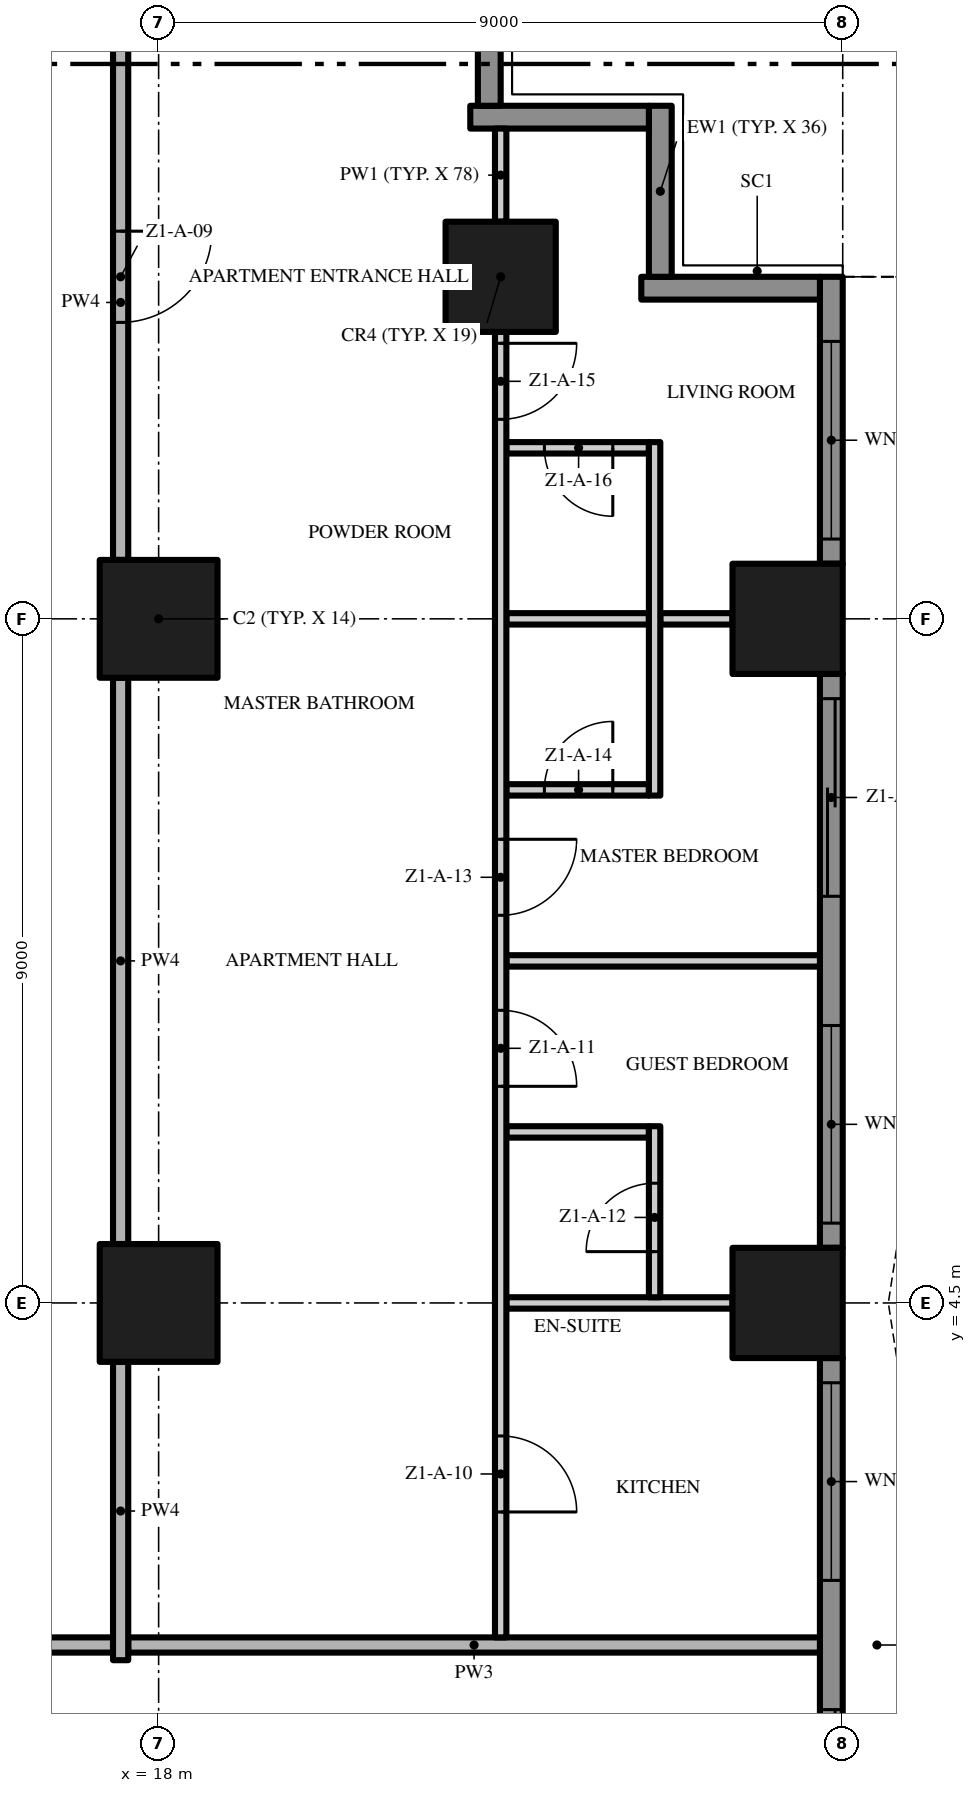
"""IFC4 building model, lengths in metres.
Left out: names, types, materials, properties, quantities, classifications, styles, units other than length and angle.
Written with IfcOpenShell. Run it as: python <this file> out.ifc"""

import sys

from ifc_helpers import new_model, si_unit, direction, frame, frame_2d, origin, origin_2d, place, context, subcontext, project, spatial, polyline, rectangle, outline, extrude, element, fill, save


model = new_model("IFC4")
c1 = context("Model", 3, precision=1e-05, world=origin(), true_north=direction((0.0, 1.0)))
c2 = subcontext(c1, "Body", "Model", "MODEL_VIEW")
j1 = project(units=[si_unit("LENGTHUNIT", "METRE"), si_unit("PLANEANGLEUNIT", "RADIAN")], contexts=[c1])
p1 = place(None, origin())
s1 = spatial("IfcSite", under=j1, at=p1, CompositionType="ELEMENT")
p2 = place(p1, origin())
s2 = spatial("IfcBuilding", under=s1, at=p2, CompositionType="ELEMENT")
p3 = place(p2, frame((0.0, 0.0, 22.6)))
s3 = spatial("IfcBuildingStorey", under=s2, at=p3, CompositionType="ELEMENT", Elevation=22.6)
for number, where, z_axis, x_axis in (
    (1, (18.0, 13.5, 0.0), (0.0, 0.0, 1.0), (1.0, 0.0, 0.0)),
    (2, (18.0, 4.5, 0.0), (0.0, 0.0, 1.0), (1.0, 0.0, 0.0)),
):
    element("IfcColumn", number, at=place(p3, frame(where, z_axis=z_axis, x_axis=x_axis)), inside=s3, PredefinedType="COLUMN", context=c2, shape_type="SweptSolid", body=[
        extrude(rectangle(XDim=1.55, YDim=1.55, at=origin_2d()), origin(), (0.0, 0.0, 1.0), 3.5),
    ])
for number, where, z_axis, x_axis in (
    (3, (26.275, 13.5, 0.0), (0.0, 0.0, 1.0), (1.0, 0.0, 0.0)),
    (4, (22.5, 18.0, 0.0), (0.0, 0.0, 1.0), (1.0, 0.0, 0.0)),
    (5, (26.275, 4.5, 0.0), (0.0, 0.0, 1.0), (1.0, 0.0, 0.0)),
):
    element("IfcColumn", number, at=place(p3, frame(where, z_axis=z_axis, x_axis=x_axis)), inside=s3, PredefinedType="COLUMN", context=c2, shape_type="SweptSolid", body=[
        extrude(rectangle(XDim=1.45, YDim=1.45, at=origin_2d()), origin(), (0.0, 0.0, 1.0), 3.5),
    ])
p4 = place(p3, frame((26.85, 3.775, 0.0), z_axis=(0.0, 0.0, 1.0), x_axis=(0.0, -1.0, 0.0)))
e6 = element("IfcWall", 6, at=p4, inside=s3, PredefinedType="SOLIDWALL", context=c2, shape_type="SweptSolid", body=[
    extrude(rectangle(XDim=7.55, YDim=0.3, at=frame_2d((3.775, 0.0))), origin(), (0.0, 0.0, 1.0), 3.5),
])
p5 = place(p4, frame((4.625, 0.0, 0.0)))
e7 = element("IfcOpeningElement", 7, at=p5, cuts=e6, PredefinedType="OPENING", context=c2, shape_type="SweptSolid", body=[
    extrude(rectangle(XDim=2.6, YDim=2.4, at=frame_2d((1.3, 1.2))), frame((0.0, 0.16, 0.0), z_axis=(0.0, -1.0, 0.0), x_axis=(1.0, 0.0, 0.0)), (0.0, 0.0, 1.0), 0.32),
])
p6 = place(p4, frame((0.325, 0.0, 0.45)))
e8 = element("IfcOpeningElement", 8, at=p6, cuts=e6, PredefinedType="OPENING", context=c2, shape_type="SweptSolid", body=[
    extrude(rectangle(XDim=2.6, YDim=2.65, at=frame_2d((1.3, 1.325))), frame((0.0, 0.16, 0.0), z_axis=(0.0, -1.0, 0.0), x_axis=(1.0, 0.0, 0.0)), (0.0, 0.0, 1.0), 0.32),
])
p7 = place(p3, frame((26.85, 12.775, 0.0), z_axis=(0.0, 0.0, 1.0), x_axis=(0.0, -1.0, 0.0)))
e9 = element("IfcWall", 9, at=p7, inside=s3, PredefinedType="SOLIDWALL", context=c2, shape_type="SweptSolid", body=[
    extrude(rectangle(XDim=7.55, YDim=0.3, at=frame_2d((3.775, 0.0))), origin(), (0.0, 0.0, 1.0), 3.5),
])
p8 = place(p7, frame((4.625, 0.0, 0.45)))
e10 = element("IfcOpeningElement", 10, at=p8, cuts=e9, PredefinedType="OPENING", context=c2, shape_type="SweptSolid", body=[
    extrude(rectangle(XDim=2.6, YDim=2.65, at=frame_2d((1.3, 1.325))), frame((0.0, 0.16, 0.0), z_axis=(0.0, -1.0, 0.0), x_axis=(1.0, 0.0, 0.0)), (0.0, 0.0, 1.0), 0.32),
])
p9 = place(p7, frame((0.325, 0.0, 0.0)))
e11 = element("IfcOpeningElement", 11, at=p9, cuts=e9, PredefinedType="OPENING", context=c2, shape_type="SweptSolid", body=[
    extrude(rectangle(XDim=2.6, YDim=2.4, at=frame_2d((1.3, 1.2))), frame((0.0, 0.16, 0.0), z_axis=(0.0, -1.0, 0.0), x_axis=(1.0, 0.0, 0.0)), (0.0, 0.0, 1.0), 0.32),
])
p10 = place(p3, frame((26.85, 18.0, 0.0), z_axis=(0.0, 0.0, 1.0), x_axis=(0.0, -1.0, 0.0)))
e12 = element("IfcWall", 12, at=p10, inside=s3, PredefinedType="SOLIDWALL", context=c2, shape_type="SweptSolid", body=[
    extrude(rectangle(XDim=3.775, YDim=0.3, at=frame_2d((1.887, 0.0))), origin(), (0.0, 0.0, 1.0), 3.5),
])
p11 = place(p10, frame((0.85, 0.0, 0.45)))
e13 = element("IfcOpeningElement", 13, at=p11, cuts=e12, PredefinedType="OPENING", context=c2, shape_type="SweptSolid", body=[
    extrude(rectangle(XDim=2.6, YDim=2.65, at=frame_2d((1.3, 1.325))), frame((0.0, 0.16, 0.0), z_axis=(0.0, -1.0, 0.0), x_axis=(1.0, 0.0, 0.0)), (0.0, 0.0, 1.0), 0.32),
])
p12 = place(p3, frame((24.35, 17.85, 0.0), z_axis=(0.0, 0.0, 1.0), x_axis=(1.0, 0.0, 0.0)))
e14 = element("IfcWall", 14, at=p12, inside=s3, PredefinedType="SOLIDWALL", context=c2, shape_type="SweptSolid", body=[
    extrude(rectangle(XDim=2.35, YDim=0.3, at=frame_2d((1.175, 0.0))), origin(), (0.0, 0.0, 1.0), 3.5),
])
p13 = place(p3, frame((24.6, 20.25, 0.0), z_axis=(0.0, 0.0, 1.0), x_axis=(0.0, -1.0, 0.0)))
e15 = element("IfcWall", 15, at=p13, inside=s3, PredefinedType="SOLIDWALL", context=c2, shape_type="SweptSolid", body=[
    extrude(rectangle(XDim=2.25, YDim=0.3, at=frame_2d((1.125, 0.0))), origin(), (0.0, 0.0, 1.0), 3.5),
])
p14 = place(p3, frame((22.1, 20.1, 0.0), z_axis=(0.0, 0.0, 1.0), x_axis=(1.0, 0.0, 0.0)))
e16 = element("IfcWall", 16, at=p14, inside=s3, PredefinedType="SOLIDWALL", context=c2, shape_type="SweptSolid", body=[
    extrude(rectangle(XDim=2.35, YDim=0.3, at=frame_2d((1.175, 0.0))), origin(), (0.0, 0.0, 1.0), 3.5),
])
p15 = place(p3, frame((22.35, 22.5, 0.0), z_axis=(0.0, 0.0, 1.0), x_axis=(0.0, -1.0, 0.0)))
e17 = element("IfcWall", 17, at=p15, inside=s3, PredefinedType="SOLIDWALL", context=c2, shape_type="SweptSolid", body=[
    extrude(rectangle(XDim=2.25, YDim=0.3, at=frame_2d((1.125, 0.0))), origin(), (0.0, 0.0, 1.0), 3.5),
])
p16 = place(p3, origin())
e18 = element("IfcWall", 18, at=p16, inside=s3, PredefinedType="USERDEFINED", context=c2, shape_type="SweptSolid", body=[
    extrude(outline(polyline([(30.0, -18.0), (29.771, -16.5), (29.171, -15.0), (28.429, -13.5), (27.829, -12.0), (27.6, -10.5), (27.829, -9.0), (28.429, -7.5), (29.171, -6.0), (29.771, -4.5), (30.0, -3.0), (29.771, -1.5), (29.171, 0.0), (28.429, 1.5), (27.829, 3.0), (27.6, 4.5), (27.829, 6.0), (28.429, 7.5), (29.171, 9.0), (29.771, 10.5), (30.0, 12.0), (29.771, 13.5), (29.171, 15.0), (28.429, 16.5), (27.829, 18.0), (27.597, 17.907), (28.201, 16.398), (28.942, 14.898), (29.528, 13.434), (29.747, 12.0), (29.528, 10.566), (28.942, 9.102), (28.201, 7.602), (27.586, 6.066), (27.347, 4.5), (27.586, 2.934), (28.201, 1.398), (28.942, -0.102), (29.528, -1.566), (29.747, -3.0), (29.528, -4.434), (28.942, -5.898), (28.201, -7.398), (27.586, -8.934), (27.347, -10.5), (27.586, -12.066), (28.201, -13.602), (28.942, -15.102), (29.528, -16.566), (29.753, -18.038), (30.0, -18.0)])), origin(), (0.0, 0.0, 1.0), 0.9),
])
p17 = place(p3, frame((17.4, 0.0, 0.0), z_axis=(0.0, 0.0, 1.0), x_axis=(-1.0, 0.0, 0.0)))
e19 = element("IfcWall", 19, at=p17, inside=s3, PredefinedType="PARTITIONING", context=c2, shape_type="SweptSolid", body=[
    extrude(rectangle(XDim=17.3, YDim=0.2, at=frame_2d((8.65, 0.0))), origin(), (0.0, 0.0, 1.0), 3.5),
])
p18 = place(p17, frame((7.65, 0.0, 0.0)))
e20 = element("IfcOpeningElement", 20, at=p18, cuts=e19, PredefinedType="OPENING", context=c2, shape_type="SweptSolid", body=[
    extrude(rectangle(XDim=1.5, YDim=2.4, at=frame_2d((0.75, 1.2))), frame((0.0, 0.11, 0.0), z_axis=(0.0, -1.0, 0.0), x_axis=(1.0, 0.0, 0.0)), (0.0, 0.0, 1.0), 0.22),
])
p19 = place(p3, frame((17.6, 0.0, 0.0), z_axis=(0.0, 0.0, 1.0), x_axis=(1.0, 0.0, 0.0)))
e21 = element("IfcWall", 21, at=p19, inside=s3, PredefinedType="PARTITIONING", context=c2, shape_type="SweptSolid", body=[
    extrude(rectangle(XDim=9.1, YDim=0.2, at=frame_2d((4.55, 0.0))), origin(), (0.0, 0.0, 1.0), 3.5),
])
p20 = place(p3, frame((22.575, 4.5, 0.0), z_axis=(0.0, 0.0, 1.0), x_axis=(1.0, 0.0, 0.0)))
e22 = element("IfcWall", 22, at=p20, inside=s3, PredefinedType="PARTITIONING", context=c2, shape_type="SweptSolid", body=[
    extrude(rectangle(XDim=2.975, YDim=0.15, at=frame_2d((1.488, 0.0))), origin(), (0.0, 0.0, 1.0), 3.5),
])
p21 = place(p3, frame((22.575, 6.75, 0.0), z_axis=(0.0, 0.0, 1.0), x_axis=(1.0, 0.0, 0.0)))
e23 = element("IfcWall", 23, at=p21, inside=s3, PredefinedType="PARTITIONING", context=c2, shape_type="SweptSolid", body=[
    extrude(rectangle(XDim=1.875, YDim=0.15, at=frame_2d((0.938, 0.0))), origin(), (0.0, 0.0, 1.0), 3.5),
])
p22 = place(p3, frame((22.575, 9.0, 0.0), z_axis=(0.0, 0.0, 1.0), x_axis=(1.0, 0.0, 0.0)))
e24 = element("IfcWall", 24, at=p22, inside=s3, PredefinedType="PARTITIONING", context=c2, shape_type="SweptSolid", body=[
    extrude(rectangle(XDim=4.125, YDim=0.15, at=frame_2d((2.062, 0.0))), origin(), (0.0, 0.0, 1.0), 3.5),
])
p23 = place(p3, frame((22.575, 11.25, 0.0), z_axis=(0.0, 0.0, 1.0), x_axis=(1.0, 0.0, 0.0)))
e25 = element("IfcWall", 25, at=p23, inside=s3, PredefinedType="PARTITIONING", context=c2, shape_type="SweptSolid", body=[
    extrude(rectangle(XDim=1.875, YDim=0.15, at=frame_2d((0.938, 0.0))), origin(), (0.0, 0.0, 1.0), 3.5),
])
p24 = place(p23, frame((0.5, 0.0, 0.0)))
e26 = element("IfcOpeningElement", 26, at=p24, cuts=e25, PredefinedType="OPENING", context=c2, shape_type="SweptSolid", body=[
    extrude(rectangle(XDim=0.9, YDim=2.1, at=frame_2d((0.45, 1.05))), frame((0.0, 0.085, 0.0), z_axis=(0.0, -1.0, 0.0), x_axis=(1.0, 0.0, 0.0)), (0.0, 0.0, 1.0), 0.17),
])
p25 = place(p3, frame((22.575, 13.5, 0.0), z_axis=(0.0, 0.0, 1.0), x_axis=(1.0, 0.0, 0.0)))
e27 = element("IfcWall", 27, at=p25, inside=s3, PredefinedType="PARTITIONING", context=c2, shape_type="SweptSolid", body=[
    extrude(rectangle(XDim=1.875, YDim=0.15, at=frame_2d((0.938, 0.0))), origin(), (0.0, 0.0, 1.0), 3.5),
])
p26 = place(p3, frame((24.6, 13.5, 0.0), z_axis=(0.0, 0.0, 1.0), x_axis=(1.0, 0.0, 0.0)))
e28 = element("IfcWall", 28, at=p26, inside=s3, PredefinedType="PARTITIONING", context=c2, shape_type="SweptSolid", body=[
    extrude(rectangle(XDim=0.95, YDim=0.15, at=frame_2d((0.475, 0.0))), origin(), (0.0, 0.0, 1.0), 3.5),
])
p27 = place(p3, frame((24.45, 15.75, 0.0), z_axis=(0.0, 0.0, 1.0), x_axis=(-1.0, 0.0, 0.0)))
e29 = element("IfcWall", 29, at=p27, inside=s3, PredefinedType="PARTITIONING", context=c2, shape_type="SweptSolid", body=[
    extrude(rectangle(XDim=1.875, YDim=0.15, at=frame_2d((0.938, 0.0))), origin(), (0.0, 0.0, 1.0), 3.5),
])
p28 = place(p27, frame((0.475, 0.0, 0.0)))
e30 = element("IfcOpeningElement", 30, at=p28, cuts=e29, PredefinedType="OPENING", context=c2, shape_type="SweptSolid", body=[
    extrude(rectangle(XDim=0.9, YDim=2.1, at=frame_2d((0.45, 1.05))), frame((0.0, 0.085, 0.0), z_axis=(0.0, -1.0, 0.0), x_axis=(1.0, 0.0, 0.0)), (0.0, 0.0, 1.0), 0.17),
])
p29 = place(p3, frame((17.5, -0.2, 0.0), z_axis=(0.0, 0.0, 1.0), x_axis=(0.0, 1.0, 0.0)))
e31 = element("IfcWall", 31, at=p29, inside=s3, PredefinedType="PARTITIONING", context=c2, shape_type="SweptSolid", body=[
    extrude(rectangle(XDim=3.925, YDim=0.2, at=frame_2d((1.962, 0.0))), origin(), (0.0, 0.0, 1.0), 3.5),
])
p30 = place(p3, frame((17.5, 5.275, 0.0), z_axis=(0.0, 0.0, 1.0), x_axis=(0.0, 1.0, 0.0)))
e32 = element("IfcWall", 32, at=p30, inside=s3, PredefinedType="PARTITIONING", context=c2, shape_type="SweptSolid", body=[
    extrude(rectangle(XDim=7.45, YDim=0.2, at=frame_2d((3.725, 0.0))), origin(), (0.0, 0.0, 1.0), 3.5),
])
p31 = place(p3, frame((17.5, 21.05, 0.0), z_axis=(0.0, 0.0, 1.0), x_axis=(0.0, -1.0, 0.0)))
e33 = element("IfcWall", 33, at=p31, inside=s3, PredefinedType="PARTITIONING", context=c2, shape_type="SweptSolid", body=[
    extrude(rectangle(XDim=6.775, YDim=0.2, at=frame_2d((3.388, 0.0))), origin(), (0.0, 0.0, 1.0), 3.5),
])
p32 = place(p31, frame((2.45, 0.0, 0.0)))
e34 = element("IfcOpeningElement", 34, at=p32, cuts=e33, PredefinedType="OPENING", context=c2, shape_type="SweptSolid", body=[
    extrude(rectangle(XDim=1.2, YDim=2.4, at=frame_2d((0.6, 1.2))), frame((0.0, 0.11, 0.0), z_axis=(0.0, -1.0, 0.0), x_axis=(1.0, 0.0, 0.0)), (0.0, 0.0, 1.0), 0.22),
])
p33 = place(p3, frame((22.5, 17.275, 0.0), z_axis=(0.0, 0.0, 1.0), x_axis=(0.0, -1.0, 0.0)))
e35 = element("IfcWall", 35, at=p33, inside=s3, PredefinedType="PARTITIONING", context=c2, shape_type="SweptSolid", body=[
    extrude(rectangle(XDim=17.175, YDim=0.15, at=frame_2d((8.588, 0.0))), origin(), (0.0, 0.0, 1.0), 3.5),
])
p34 = place(p33, frame((14.525, 0.0, 0.0)))
e36 = element("IfcOpeningElement", 36, at=p34, cuts=e35, PredefinedType="OPENING", context=c2, shape_type="SweptSolid", body=[
    extrude(rectangle(XDim=1.0, YDim=2.4, at=frame_2d((0.5, 1.2))), frame((0.0, 0.085, 0.0), z_axis=(0.0, -1.0, 0.0), x_axis=(1.0, 0.0, 0.0)), (0.0, 0.0, 1.0), 0.17),
])
p35 = place(p33, frame((8.925, 0.0, 0.0)))
e37 = element("IfcOpeningElement", 37, at=p35, cuts=e35, PredefinedType="OPENING", context=c2, shape_type="SweptSolid", body=[
    extrude(rectangle(XDim=1.0, YDim=2.4, at=frame_2d((0.5, 1.2))), frame((0.0, 0.085, 0.0), z_axis=(0.0, -1.0, 0.0), x_axis=(1.0, 0.0, 0.0)), (0.0, 0.0, 1.0), 0.17),
])
p36 = place(p33, frame((6.675, 0.0, 0.0)))
e38 = element("IfcOpeningElement", 38, at=p36, cuts=e35, PredefinedType="OPENING", context=c2, shape_type="SweptSolid", body=[
    extrude(rectangle(XDim=1.0, YDim=2.4, at=frame_2d((0.5, 1.2))), frame((0.0, 0.085, 0.0), z_axis=(0.0, -1.0, 0.0), x_axis=(1.0, 0.0, 0.0)), (0.0, 0.0, 1.0), 0.17),
])
p37 = place(p33, frame((0.15, 0.0, 0.0)))
e39 = element("IfcOpeningElement", 39, at=p37, cuts=e35, PredefinedType="OPENING", context=c2, shape_type="SweptSolid", body=[
    extrude(rectangle(XDim=1.0, YDim=2.4, at=frame_2d((0.5, 1.2))), frame((0.0, 0.085, 0.0), z_axis=(0.0, -1.0, 0.0), x_axis=(1.0, 0.0, 0.0)), (0.0, 0.0, 1.0), 0.17),
])
p38 = place(p3, frame((22.5, 18.725, 0.0), z_axis=(0.0, 0.0, 1.0), x_axis=(0.0, 1.0, 0.0)))
e40 = element("IfcWall", 40, at=p38, inside=s3, PredefinedType="PARTITIONING", context=c2, shape_type="SweptSolid", body=[
    extrude(rectangle(XDim=1.225, YDim=0.15, at=frame_2d((0.613, 0.0))), origin(), (0.0, 0.0, 1.0), 3.5),
])
p39 = place(p3, frame((24.525, 4.575, 0.0), z_axis=(0.0, 0.0, 1.0), x_axis=(0.0, 1.0, 0.0)))
e41 = element("IfcWall", 41, at=p39, inside=s3, PredefinedType="PARTITIONING", context=c2, shape_type="SweptSolid", body=[
    extrude(rectangle(XDim=2.25, YDim=0.15, at=frame_2d((1.125, 0.0))), origin(), (0.0, 0.0, 1.0), 3.5),
])
p40 = place(p39, frame((0.6, 0.0, 0.0)))
e42 = element("IfcOpeningElement", 42, at=p40, cuts=e41, PredefinedType="OPENING", context=c2, shape_type="SweptSolid", body=[
    extrude(rectangle(XDim=0.9, YDim=2.1, at=frame_2d((0.45, 1.05))), frame((0.0, 0.085, 0.0), z_axis=(0.0, -1.0, 0.0), x_axis=(1.0, 0.0, 0.0)), (0.0, 0.0, 1.0), 0.17),
])
p41 = place(p3, frame((24.525, 11.175, 0.0), z_axis=(0.0, 0.0, 1.0), x_axis=(0.0, 1.0, 0.0)))
e43 = element("IfcWall", 43, at=p41, inside=s3, PredefinedType="PARTITIONING", context=c2, shape_type="SweptSolid", body=[
    extrude(rectangle(XDim=4.65, YDim=0.15, at=frame_2d((2.325, 0.0))), origin(), (0.0, 0.0, 1.0), 3.5),
])
p42 = place(p5, origin())
e44 = element("IfcDoor", 44, at=p42, inside=s3, OperationType="SINGLE_SWING_LEFT", PredefinedType="DOOR", context=c2, shape_type="SweptSolid", body=[
    extrude(rectangle(XDim=2.6, YDim=2.4, at=frame_2d((1.3, 1.2))), frame((0.0, 0.025, 0.0), z_axis=(0.0, -1.0, 0.0), x_axis=(1.0, 0.0, 0.0)), (0.0, 0.0, 1.0), 0.05),
])
fill(e7, e44)
p43 = place(p6, origin())
e45 = element("IfcWindow", 45, at=p43, inside=s3, PartitioningType="SINGLE_PANEL", PredefinedType="WINDOW", context=c2, shape_type="SweptSolid", body=[
    extrude(rectangle(XDim=2.6, YDim=2.65, at=frame_2d((1.3, 1.325))), frame((0.0, 0.03, 0.0), z_axis=(0.0, -1.0, 0.0), x_axis=(1.0, 0.0, 0.0)), (0.0, 0.0, 1.0), 0.06),
])
fill(e8, e45)
p44 = place(p8, origin())
e46 = element("IfcWindow", 46, at=p44, inside=s3, PartitioningType="SINGLE_PANEL", PredefinedType="WINDOW", context=c2, shape_type="SweptSolid", body=[
    extrude(rectangle(XDim=2.6, YDim=2.65, at=frame_2d((1.3, 1.325))), frame((0.0, 0.03, 0.0), z_axis=(0.0, -1.0, 0.0), x_axis=(1.0, 0.0, 0.0)), (0.0, 0.0, 1.0), 0.06),
])
fill(e10, e46)
p45 = place(p9, origin())
e47 = element("IfcDoor", 47, at=p45, inside=s3, OperationType="SINGLE_SWING_LEFT", PredefinedType="DOOR", context=c2, shape_type="SweptSolid", body=[
    extrude(rectangle(XDim=2.6, YDim=2.4, at=frame_2d((1.3, 1.2))), frame((0.0, 0.025, 0.0), z_axis=(0.0, -1.0, 0.0), x_axis=(1.0, 0.0, 0.0)), (0.0, 0.0, 1.0), 0.05),
])
fill(e11, e47)
p46 = place(p11, origin())
e48 = element("IfcWindow", 48, at=p46, inside=s3, PartitioningType="SINGLE_PANEL", PredefinedType="WINDOW", context=c2, shape_type="SweptSolid", body=[
    extrude(rectangle(XDim=2.6, YDim=2.65, at=frame_2d((1.3, 1.325))), frame((0.0, 0.03, 0.0), z_axis=(0.0, -1.0, 0.0), x_axis=(1.0, 0.0, 0.0)), (0.0, 0.0, 1.0), 0.06),
])
fill(e13, e48)
p47 = place(p32, origin())
e49 = element("IfcDoor", 49, at=p47, inside=s3, OperationType="SINGLE_SWING_LEFT", PredefinedType="DOOR", context=c2, shape_type="SweptSolid", body=[
    extrude(rectangle(XDim=1.2, YDim=2.4, at=frame_2d((0.6, 1.2))), frame((0.0, 0.025, 0.0), z_axis=(0.0, -1.0, 0.0), x_axis=(1.0, 0.0, 0.0)), (0.0, 0.0, 1.0), 0.05),
])
fill(e34, e49)
p48 = place(p34, origin())
e50 = element("IfcDoor", 50, at=p48, inside=s3, OperationType="SINGLE_SWING_RIGHT", PredefinedType="DOOR", context=c2, shape_type="SweptSolid", body=[
    extrude(rectangle(XDim=1.0, YDim=2.4, at=frame_2d((0.5, 1.2))), frame((0.0, 0.025, 0.0), z_axis=(0.0, -1.0, 0.0), x_axis=(1.0, 0.0, 0.0)), (0.0, 0.0, 1.0), 0.05),
])
fill(e36, e50)
p49 = place(p35, origin())
e51 = element("IfcDoor", 51, at=p49, inside=s3, OperationType="SINGLE_SWING_RIGHT", PredefinedType="DOOR", context=c2, shape_type="SweptSolid", body=[
    extrude(rectangle(XDim=1.0, YDim=2.4, at=frame_2d((0.5, 1.2))), frame((0.0, 0.025, 0.0), z_axis=(0.0, -1.0, 0.0), x_axis=(1.0, 0.0, 0.0)), (0.0, 0.0, 1.0), 0.05),
])
fill(e37, e51)
p50 = place(p40, origin())
e52 = element("IfcDoor", 52, at=p50, inside=s3, OperationType="SINGLE_SWING_LEFT", PredefinedType="DOOR", context=c2, shape_type="SweptSolid", body=[
    extrude(rectangle(XDim=0.9, YDim=2.1, at=frame_2d((0.45, 1.05))), frame((0.0, 0.025, 0.0), z_axis=(0.0, -1.0, 0.0), x_axis=(1.0, 0.0, 0.0)), (0.0, 0.0, 1.0), 0.05),
])
fill(e42, e52)
p51 = place(p36, origin())
e53 = element("IfcDoor", 53, at=p51, inside=s3, OperationType="SINGLE_SWING_LEFT", PredefinedType="DOOR", context=c2, shape_type="SweptSolid", body=[
    extrude(rectangle(XDim=1.0, YDim=2.4, at=frame_2d((0.5, 1.2))), frame((0.0, 0.025, 0.0), z_axis=(0.0, -1.0, 0.0), x_axis=(1.0, 0.0, 0.0)), (0.0, 0.0, 1.0), 0.05),
])
fill(e38, e53)
p52 = place(p24, origin())
e54 = element("IfcDoor", 54, at=p52, inside=s3, OperationType="SINGLE_SWING_RIGHT", PredefinedType="DOOR", context=c2, shape_type="SweptSolid", body=[
    extrude(rectangle(XDim=0.9, YDim=2.1, at=frame_2d((0.45, 1.05))), frame((0.0, 0.025, 0.0), z_axis=(0.0, -1.0, 0.0), x_axis=(1.0, 0.0, 0.0)), (0.0, 0.0, 1.0), 0.05),
])
fill(e26, e54)
p53 = place(p37, origin())
e55 = element("IfcDoor", 55, at=p53, inside=s3, OperationType="SINGLE_SWING_LEFT", PredefinedType="DOOR", context=c2, shape_type="SweptSolid", body=[
    extrude(rectangle(XDim=1.0, YDim=2.4, at=frame_2d((0.5, 1.2))), frame((0.0, 0.025, 0.0), z_axis=(0.0, -1.0, 0.0), x_axis=(1.0, 0.0, 0.0)), (0.0, 0.0, 1.0), 0.05),
])
fill(e39, e55)
p54 = place(p28, origin())
e56 = element("IfcDoor", 56, at=p54, inside=s3, OperationType="SINGLE_SWING_LEFT", PredefinedType="DOOR", context=c2, shape_type="SweptSolid", body=[
    extrude(rectangle(XDim=0.9, YDim=2.1, at=frame_2d((0.45, 1.05))), frame((0.0, 0.025, 0.0), z_axis=(0.0, -1.0, 0.0), x_axis=(1.0, 0.0, 0.0)), (0.0, 0.0, 1.0), 0.05),
])
fill(e30, e56)
save(model, sys.argv[1])
